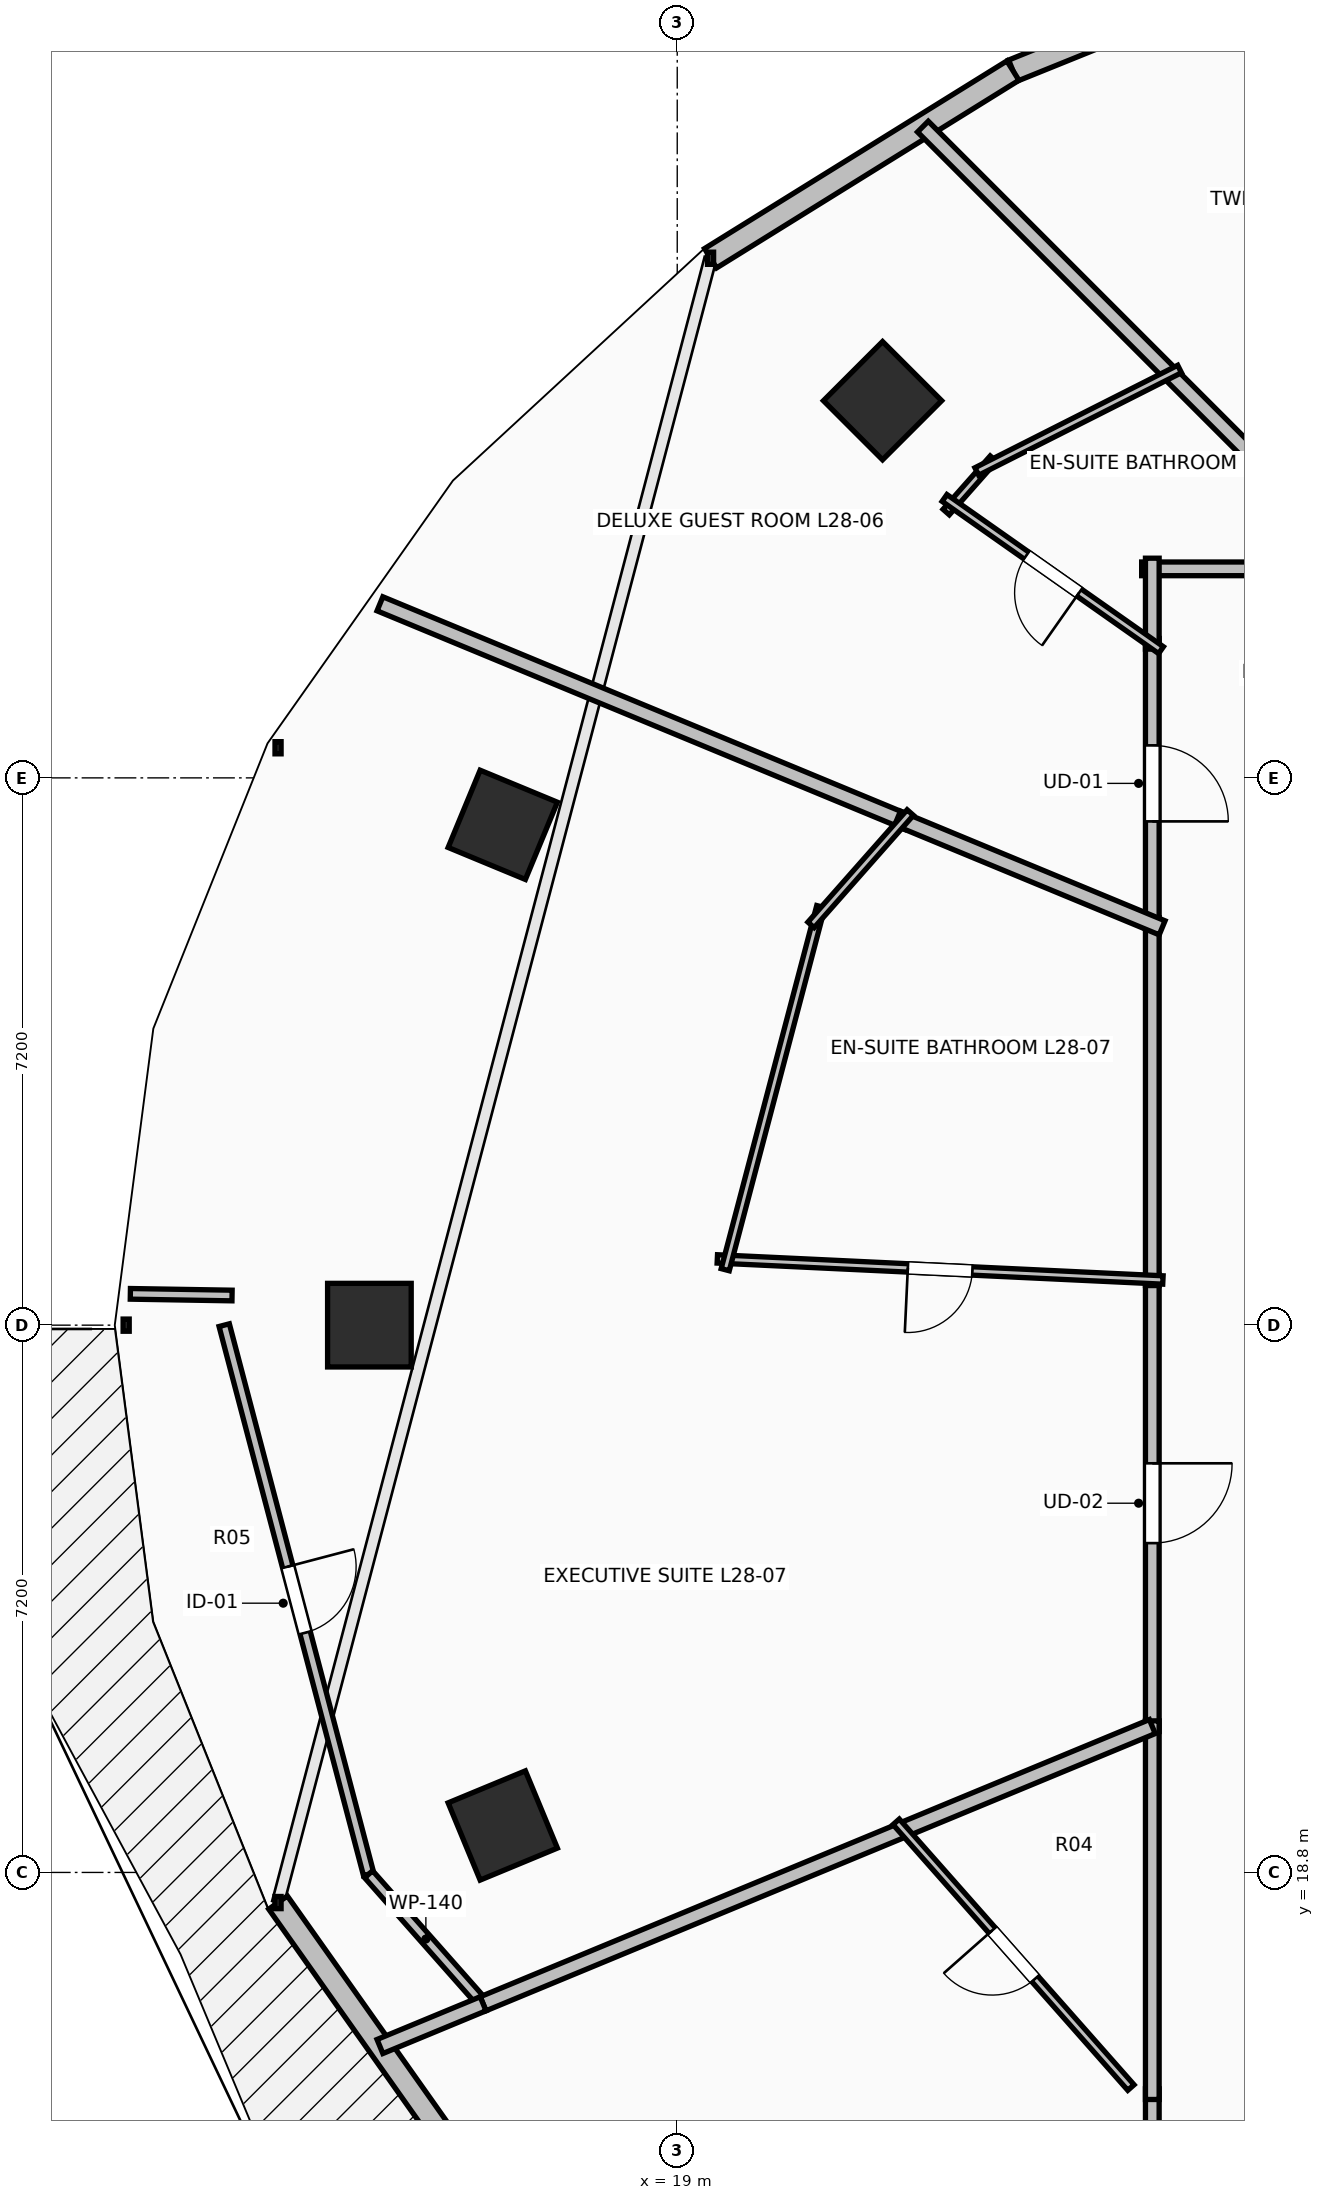
"""IFC4 building model, lengths in metres.
Left out: names, types, materials, properties, quantities, classifications, styles, units other than length and angle.
Written with IfcOpenShell. Run it as: python <this file> out.ifc"""

import sys

from ifc_helpers import new_model, si_unit, direction, frame, frame_2d, origin, origin_2d, place, context, subcontext, project, spatial, rectangle, extrude, element, fill, save


model = new_model("IFC4")
c1 = context("Model", 3, precision=1e-05, world=origin(), true_north=direction((0.0, 1.0)))
c2 = subcontext(c1, "Body", "Model", "MODEL_VIEW")
j1 = project(units=[si_unit("LENGTHUNIT", "METRE"), si_unit("PLANEANGLEUNIT", "RADIAN")], contexts=[c1])
p1 = place(None, origin())
s1 = spatial("IfcSite", under=j1, at=p1, CompositionType="ELEMENT")
p2 = place(p1, origin())
s2 = spatial("IfcBuilding", under=s1, at=p2, CompositionType="ELEMENT")
p3 = place(p2, frame((0.0, 0.0, 106.8)))
s3 = spatial("IfcBuildingStorey", under=s2, at=p3, CompositionType="ELEMENT", Elevation=106.8)
for number, where, z_axis, x_axis in (
    (1, (21.701, 38.162, 0.0), (0.0, 0.0, 1.0), (-0.707, 0.707, 0.0)),
    (2, (16.705, 32.582, 0.0), (0.0, 0.0, 1.0), (-0.924, 0.383, 0.0)),
    (3, (14.95, 26.0, 0.0), (0.0, 0.0, 1.0), (-1.0, 0.0, 0.0)),
    (4, (16.705, 19.418, 0.0), (0.0, 0.0, 1.0), (-0.924, -0.383, 0.0)),
):
    element("IfcColumn", number, at=place(p3, frame(where, z_axis=z_axis, x_axis=x_axis)), inside=s3, PredefinedType="COLUMN", context=c2, shape_type="SweptSolid", body=[
        extrude(rectangle(XDim=1.1, YDim=1.1, at=origin_2d()), origin(), (0.0, 0.0, 1.0), 3.5),
    ])
p4 = place(p3, frame((27.955, 44.339, 0.0), z_axis=(0.0, 0.0, 1.0), x_axis=(-0.927122233109, -0.374759075775, 0.0)))
e5 = element("IfcWall", 5, at=p4, inside=s3, PredefinedType="STANDARD", context=c2, shape_type="SweptSolid", body=[
    extrude(rectangle(XDim=4.895, YDim=0.3, at=frame_2d((2.448, 0.0))), origin(), (0.0, 0.0, 1.0), 3.24),
])
p5 = place(p4, frame((1.877, 0.0, 0.85)))
e6 = element("IfcOpeningElement", 6, at=p5, cuts=e5, PredefinedType="OPENING", context=c2, shape_type="SweptSolid", body=[
    extrude(rectangle(XDim=1.2, YDim=1.95, at=frame_2d((0.6, 0.975))), frame((0.0, 0.165, 0.0), z_axis=(0.0, -1.0, 0.0), x_axis=(1.0, 0.0, 0.0)), (0.0, 0.0, 1.0), 0.33),
])
p6 = place(p3, frame((23.416, 42.505, 0.0), z_axis=(0.0, 0.0, 1.0), x_axis=(-0.849684479743, -0.527291461038, 0.0)))
e7 = element("IfcWall", 7, at=p6, inside=s3, PredefinedType="STANDARD", context=c2, shape_type="SweptSolid", body=[
    extrude(rectangle(XDim=4.681, YDim=0.3, at=frame_2d((2.341, 0.0))), origin(), (0.0, 0.0, 1.0), 3.24),
])
p7 = place(p3, frame((13.748, 18.404, 0.0), z_axis=(0.0, 0.0, 1.0), x_axis=(0.57716435238, -0.81662801222, 0.0)))
e8 = element("IfcWall", 8, at=p7, inside=s3, PredefinedType="STANDARD", context=c2, shape_type="SweptSolid", body=[
    extrude(rectangle(XDim=4.202, YDim=0.3, at=frame_2d((2.101, 0.0))), origin(), (0.0, 0.0, 1.0), 3.24),
])
p8 = place(p3, frame((25.25, 35.034, 0.0), z_axis=(0.0, 0.0, 1.0), x_axis=(0.0, -1.0, 0.0)))
e9 = element("IfcWall", 9, at=p8, inside=s3, PredefinedType="PARTITIONING", context=c2, shape_type="SweptSolid", body=[
    extrude(rectangle(XDim=3.813, YDim=0.18, at=frame_2d((1.906, 0.0))), origin(), (0.0, 0.0, 1.0), 2.432),
])
p9 = place(p8, frame((1.406, 0.0, 0.0)))
e10 = element("IfcOpeningElement", 10, at=p9, cuts=e9, PredefinedType="OPENING", context=c2, shape_type="SweptSolid", body=[
    extrude(rectangle(XDim=1.0, YDim=2.15, at=frame_2d((0.5, 1.075))), frame((0.0, 0.105, 0.0), z_axis=(0.0, -1.0, 0.0), x_axis=(1.0, 0.0, 0.0)), (0.0, 0.0, 1.0), 0.21),
])
p10 = place(p3, frame((28.105, 35.95, 0.0), z_axis=(0.0, 0.0, 1.0), x_axis=(-1.0, 0.0, 0.0)))
e11 = element("IfcWall", 11, at=p10, inside=s3, PredefinedType="PARTITIONING", context=c2, shape_type="SweptSolid", body=[
    extrude(rectangle(XDim=2.995, YDim=0.18, at=frame_2d((1.498, 0.0))), origin(), (0.0, 0.0, 1.0), 2.432),
])
p11 = place(p3, frame((25.25, 36.09, 0.0), z_axis=(0.0, 0.0, 1.0), x_axis=(0.0, -1.0, 0.0)))
e12 = element("IfcWall", 12, at=p11, inside=s3, PredefinedType="PARTITIONING", context=c2, shape_type="SweptSolid", body=[
    extrude(rectangle(XDim=1.196, YDim=0.18, at=frame_2d((0.598, 0.0))), origin(), (0.0, 0.0, 1.0), 2.432),
])
p12 = place(p3, frame((25.25, 26.661, 0.0), z_axis=(0.0, 0.0, 1.0), x_axis=(0.0, -1.0, 0.0)))
e13 = element("IfcWall", 13, at=p12, inside=s3, PredefinedType="PARTITIONING", context=c2, shape_type="SweptSolid", body=[
    extrude(rectangle(XDim=6.007, YDim=0.18, at=frame_2d((3.003, 0.0))), origin(), (0.0, 0.0, 1.0), 3.24),
])
p13 = place(p12, frame((2.479, 0.0, 0.0)))
e14 = element("IfcOpeningElement", 14, at=p13, cuts=e13, PredefinedType="OPENING", context=c2, shape_type="SweptSolid", body=[
    extrude(rectangle(XDim=1.05, YDim=2.2, at=frame_2d((0.525, 1.1))), frame((0.0, 0.105, 0.0), z_axis=(0.0, -1.0, 0.0), x_axis=(1.0, 0.0, 0.0)), (0.0, 0.0, 1.0), 0.21),
])
p14 = place(p3, frame((25.25, 31.361, 0.0), z_axis=(0.0, 0.0, 1.0), x_axis=(0.0, -1.0, 0.0)))
e15 = element("IfcWall", 15, at=p14, inside=s3, PredefinedType="PARTITIONING", context=c2, shape_type="SweptSolid", body=[
    extrude(rectangle(XDim=4.84, YDim=0.18, at=frame_2d((2.42, 0.0))), origin(), (0.0, 0.0, 1.0), 2.432),
])
p15 = place(p3, frame((25.25, 15.953, 0.0), z_axis=(0.0, 0.0, 1.0), x_axis=(0.0, -1.0, 0.0)))
e16 = element("IfcWall", 16, at=p15, inside=s3, PredefinedType="PARTITIONING", context=c2, shape_type="SweptSolid", body=[
    extrude(rectangle(XDim=1.853, YDim=0.18, at=frame_2d((0.926, 0.0))), origin(), (0.0, 0.0, 1.0), 2.432),
])
p16 = place(p3, frame((25.25, 20.794, 0.0), z_axis=(0.0, 0.0, 1.0), x_axis=(0.0, -1.0, 0.0)))
e17 = element("IfcWall", 17, at=p16, inside=s3, PredefinedType="PARTITIONING", context=c2, shape_type="SweptSolid", body=[
    extrude(rectangle(XDim=4.981, YDim=0.18, at=frame_2d((2.49, 0.0))), origin(), (0.0, 0.0, 1.0), 2.432),
])
p17 = place(p3, frame((22.232, 41.768, 0.0), z_axis=(0.0, 0.0, 1.0), x_axis=(0.707106781187, -0.707106781187, 0.0)))
e18 = element("IfcWall", 18, at=p17, inside=s3, PredefinedType="PARTITIONING", context=c2, shape_type="SweptSolid", body=[
    extrude(rectangle(XDim=8.228, YDim=0.2, at=frame_2d((4.114, 0.0))), origin(), (0.0, 0.0, 1.0), 2.432),
])
p18 = place(p3, frame((22.538, 36.697, 0.0), z_axis=(0.0, 0.0, 1.0), x_axis=(0.662242037053, 0.749289986827, 0.0)))
e19 = element("IfcWall", 19, at=p18, inside=s3, PredefinedType="PARTITIONING", context=c2, shape_type="SweptSolid", body=[
    extrude(rectangle(XDim=0.937, YDim=0.11, at=frame_2d((0.468, 0.0))), origin(), (0.0, 0.0, 1.0), 2.432),
])
p19 = place(p3, frame((22.941, 37.231, 0.0), z_axis=(0.0, 0.0, 1.0), x_axis=(0.892507731149, 0.451032094024, 0.0)))
e20 = element("IfcWall", 20, at=p19, inside=s3, PredefinedType="PARTITIONING", context=c2, shape_type="SweptSolid", body=[
    extrude(rectangle(XDim=2.989, YDim=0.11, at=frame_2d((1.495, 0.0))), origin(), (0.0, 0.0, 1.0), 2.432),
])
p20 = place(p3, frame((25.365, 34.881, 0.0), z_axis=(0.0, 0.0, 1.0), x_axis=(-0.81809360258, 0.575085087111, 0.0)))
e21 = element("IfcWall", 21, at=p20, inside=s3, PredefinedType="PARTITIONING", context=c2, shape_type="SweptSolid", body=[
    extrude(rectangle(XDim=3.481, YDim=0.11, at=frame_2d((1.741, 0.0))), origin(), (0.0, 0.0, 1.0), 2.432),
])
p21 = place(p20, frame((1.316, 0.0, 0.0)))
e22 = element("IfcOpeningElement", 22, at=p21, cuts=e21, PredefinedType="OPENING", context=c2, shape_type="SweptSolid", body=[
    extrude(rectangle(XDim=0.85, YDim=2.1, at=frame_2d((0.425, 1.05))), frame((0.0, 0.07, 0.0), z_axis=(0.0, -1.0, 0.0), x_axis=(1.0, 0.0, 0.0)), (0.0, 0.0, 1.0), 0.14),
])
p22 = place(p3, frame((15.089, 35.49, 0.0), z_axis=(0.0, 0.0, 1.0), x_axis=(0.923888472039, -0.382661849723, 0.0)))
e23 = element("IfcWall", 23, at=p22, inside=s3, PredefinedType="PARTITIONING", context=c2, shape_type="SweptSolid", body=[
    extrude(rectangle(XDim=7.51, YDim=0.2, at=frame_2d((3.755, 0.0))), origin(), (0.0, 0.0, 1.0), 2.677),
])
p23 = place(p3, frame((21.899, 32.669, 0.0), z_axis=(0.0, 0.0, 1.0), x_axis=(0.923843852071, -0.382769561211, 0.0)))
e24 = element("IfcWall", 24, at=p23, inside=s3, PredefinedType="PARTITIONING", context=c2, shape_type="SweptSolid", body=[
    extrude(rectangle(XDim=3.768, YDim=0.2, at=frame_2d((1.884, 0.0))), origin(), (0.0, 0.0, 1.0), 2.886),
])
p24 = place(p3, frame((25.39, 26.594, 0.0), z_axis=(0.0, 0.0, 1.0), x_axis=(-0.998884920498, 0.047211392719, 0.0)))
e25 = element("IfcWall", 25, at=p24, inside=s3, PredefinedType="PARTITIONING", context=c2, shape_type="SweptSolid", body=[
    extrude(rectangle(XDim=5.869, YDim=0.11, at=frame_2d((2.935, 0.0))), origin(), (0.0, 0.0, 1.0), 2.432),
])
p25 = place(p24, frame((2.51, 0.0, 0.0)))
e26 = element("IfcOpeningElement", 26, at=p25, cuts=e25, PredefinedType="OPENING", context=c2, shape_type="SweptSolid", body=[
    extrude(rectangle(XDim=0.85, YDim=2.1, at=frame_2d((0.425, 1.05))), frame((0.0, 0.07, 0.0), z_axis=(0.0, -1.0, 0.0), x_axis=(1.0, 0.0, 0.0)), (0.0, 0.0, 1.0), 0.14),
])
p26 = place(p3, frame((19.631, 26.729, 0.0), z_axis=(0.0, 0.0, 1.0), x_axis=(0.254541956306, 0.967061731473, 0.0)))
e27 = element("IfcWall", 27, at=p26, inside=s3, PredefinedType="PARTITIONING", context=c2, shape_type="SweptSolid", body=[
    extrude(rectangle(XDim=4.939, YDim=0.11, at=frame_2d((2.47, 0.0))), origin(), (0.0, 0.0, 1.0), 2.432),
])
p27 = place(p3, frame((20.76, 31.266, 0.0), z_axis=(0.0, 0.0, 1.0), x_axis=(0.662047420969, 0.749461948593, 0.0)))
e28 = element("IfcWall", 28, at=p27, inside=s3, PredefinedType="PARTITIONING", context=c2, shape_type="SweptSolid", body=[
    extrude(rectangle(XDim=1.972, YDim=0.11, at=frame_2d((0.986, 0.0))), origin(), (0.0, 0.0, 1.0), 3.24),
])
p28 = place(p3, frame((11.805, 26.412, 0.0), z_axis=(0.0, 0.0, 1.0), x_axis=(0.999862201843, -0.01660052187, 0.0)))
e29 = element("IfcWall", 29, at=p28, inside=s3, PredefinedType="PARTITIONING", context=c2, shape_type="SweptSolid", body=[
    extrude(rectangle(XDim=1.338, YDim=0.14, at=frame_2d((0.669, 0.0))), origin(), (0.0, 0.0, 1.0), 3.24),
])
p29 = place(p3, frame((13.04, 26.0, 0.0), z_axis=(0.0, 0.0, 1.0), x_axis=(0.254345287821, -0.967113475536, 0.0)))
e30 = element("IfcWall", 30, at=p29, inside=s3, PredefinedType="PARTITIONING", context=c2, shape_type="SweptSolid", body=[
    extrude(rectangle(XDim=7.47, YDim=0.14, at=frame_2d((3.735, 0.0))), origin(), (0.0, 0.0, 1.0), 3.24),
])
p30 = place(p29, frame((3.285, 0.0, 0.0)))
e31 = element("IfcOpeningElement", 31, at=p30, cuts=e30, PredefinedType="OPENING", context=c2, shape_type="SweptSolid", body=[
    extrude(rectangle(XDim=0.9, YDim=2.1, at=frame_2d((0.45, 1.05))), frame((0.0, 0.085, 0.0), z_axis=(0.0, -1.0, 0.0), x_axis=(1.0, 0.0, 0.0)), (0.0, 0.0, 1.0), 0.17),
])
p31 = place(p3, frame((14.94, 18.776, 0.0), z_axis=(0.0, 0.0, 1.0), x_axis=(0.662288913482, -0.749248553605, 0.0)))
e32 = element("IfcWall", 32, at=p31, inside=s3, PredefinedType="PARTITIONING", context=c2, shape_type="SweptSolid", body=[
    extrude(rectangle(XDim=2.274, YDim=0.14, at=frame_2d((1.137, 0.0))), origin(), (0.0, 0.0, 1.0), 3.24),
])
p32 = place(p3, frame((16.446, 17.072, 0.0), z_axis=(0.0, 0.0, 1.0), x_axis=(0.92387006918, 0.382706278068, 0.0)))
e33 = element("IfcWall", 33, at=p32, inside=s3, PredefinedType="PARTITIONING", context=c2, shape_type="SweptSolid", body=[
    extrude(rectangle(XDim=9.53, YDim=0.2, at=frame_2d((4.765, 0.0))), origin(), (0.0, 0.0, 1.0), 2.432),
])
p33 = place(p3, frame((15.089, 16.51, 0.0), z_axis=(0.0, 0.0, 1.0), x_axis=(0.923891226159, 0.382655200183, 0.0)))
e34 = element("IfcWall", 34, at=p33, inside=s3, PredefinedType="PARTITIONING", context=c2, shape_type="SweptSolid", body=[
    extrude(rectangle(XDim=1.469, YDim=0.2, at=frame_2d((0.734, 0.0))), origin(), (0.0, 0.0, 1.0), 3.24),
])
p34 = place(p3, frame((24.969, 15.97, 0.0), z_axis=(0.0, 0.0, 1.0), x_axis=(-0.662106207726, 0.749410014405, 0.0)))
e35 = element("IfcWall", 35, at=p34, inside=s3, PredefinedType="PARTITIONING", context=c2, shape_type="SweptSolid", body=[
    extrude(rectangle(XDim=4.665, YDim=0.11, at=frame_2d((2.332, 0.0))), origin(), (0.0, 0.0, 1.0), 2.432),
])
p35 = place(p34, frame((1.907, 0.0, 0.0)))
e36 = element("IfcOpeningElement", 36, at=p35, cuts=e35, PredefinedType="OPENING", context=c2, shape_type="SweptSolid", body=[
    extrude(rectangle(XDim=0.85, YDim=2.1, at=frame_2d((0.425, 1.05))), frame((0.0, 0.07, 0.0), z_axis=(0.0, -1.0, 0.0), x_axis=(1.0, 0.0, 0.0)), (0.0, 0.0, 1.0), 0.14),
])
p36 = place(p9, origin())
e37 = element("IfcDoor", 37, at=p36, inside=s3, OperationType="SINGLE_SWING_RIGHT", PredefinedType="DOOR", context=c2, shape_type="SweptSolid", body=[
    extrude(rectangle(XDim=1.0, YDim=2.15, at=frame_2d((0.5, 1.075))), frame((0.0, 0.025, 0.0), z_axis=(0.0, -1.0, 0.0), x_axis=(1.0, 0.0, 0.0)), (0.0, 0.0, 1.0), 0.05),
])
fill(e10, e37)
p37 = place(p13, origin())
e38 = element("IfcDoor", 38, at=p37, inside=s3, OperationType="SINGLE_SWING_LEFT", PredefinedType="DOOR", context=c2, shape_type="SweptSolid", body=[
    extrude(rectangle(XDim=1.05, YDim=2.2, at=frame_2d((0.525, 1.1))), frame((0.0, 0.025, 0.0), z_axis=(0.0, -1.0, 0.0), x_axis=(1.0, 0.0, 0.0)), (0.0, 0.0, 1.0), 0.05),
])
fill(e14, e38)
p38 = place(p21, origin())
e39 = element("IfcDoor", 39, at=p38, inside=s3, OperationType="SINGLE_SWING_LEFT", PredefinedType="DOOR", context=c2, shape_type="SweptSolid", body=[
    extrude(rectangle(XDim=0.85, YDim=2.1, at=frame_2d((0.425, 1.05))), frame((0.0, 0.025, 0.0), z_axis=(0.0, -1.0, 0.0), x_axis=(1.0, 0.0, 0.0)), (0.0, 0.0, 1.0), 0.05),
])
fill(e22, e39)
p39 = place(p25, origin())
e40 = element("IfcDoor", 40, at=p39, inside=s3, OperationType="SINGLE_SWING_RIGHT", PredefinedType="DOOR", context=c2, shape_type="SweptSolid", body=[
    extrude(rectangle(XDim=0.85, YDim=2.1, at=frame_2d((0.425, 1.05))), frame((0.0, 0.025, 0.0), z_axis=(0.0, -1.0, 0.0), x_axis=(1.0, 0.0, 0.0)), (0.0, 0.0, 1.0), 0.05),
])
fill(e26, e40)
p40 = place(p30, origin())
e41 = element("IfcDoor", 41, at=p40, inside=s3, OperationType="SINGLE_SWING_LEFT", PredefinedType="DOOR", context=c2, shape_type="SweptSolid", body=[
    extrude(rectangle(XDim=0.9, YDim=2.1, at=frame_2d((0.45, 1.05))), frame((0.0, 0.025, 0.0), z_axis=(0.0, -1.0, 0.0), x_axis=(1.0, 0.0, 0.0)), (0.0, 0.0, 1.0), 0.05),
])
fill(e31, e41)
p41 = place(p35, origin())
e42 = element("IfcDoor", 42, at=p41, inside=s3, OperationType="SINGLE_SWING_RIGHT", PredefinedType="DOOR", context=c2, shape_type="SweptSolid", body=[
    extrude(rectangle(XDim=0.85, YDim=2.1, at=frame_2d((0.425, 1.05))), frame((0.0, 0.025, 0.0), z_axis=(0.0, -1.0, 0.0), x_axis=(1.0, 0.0, 0.0)), (0.0, 0.0, 1.0), 0.05),
])
fill(e36, e42)
save(model, sys.argv[1])
